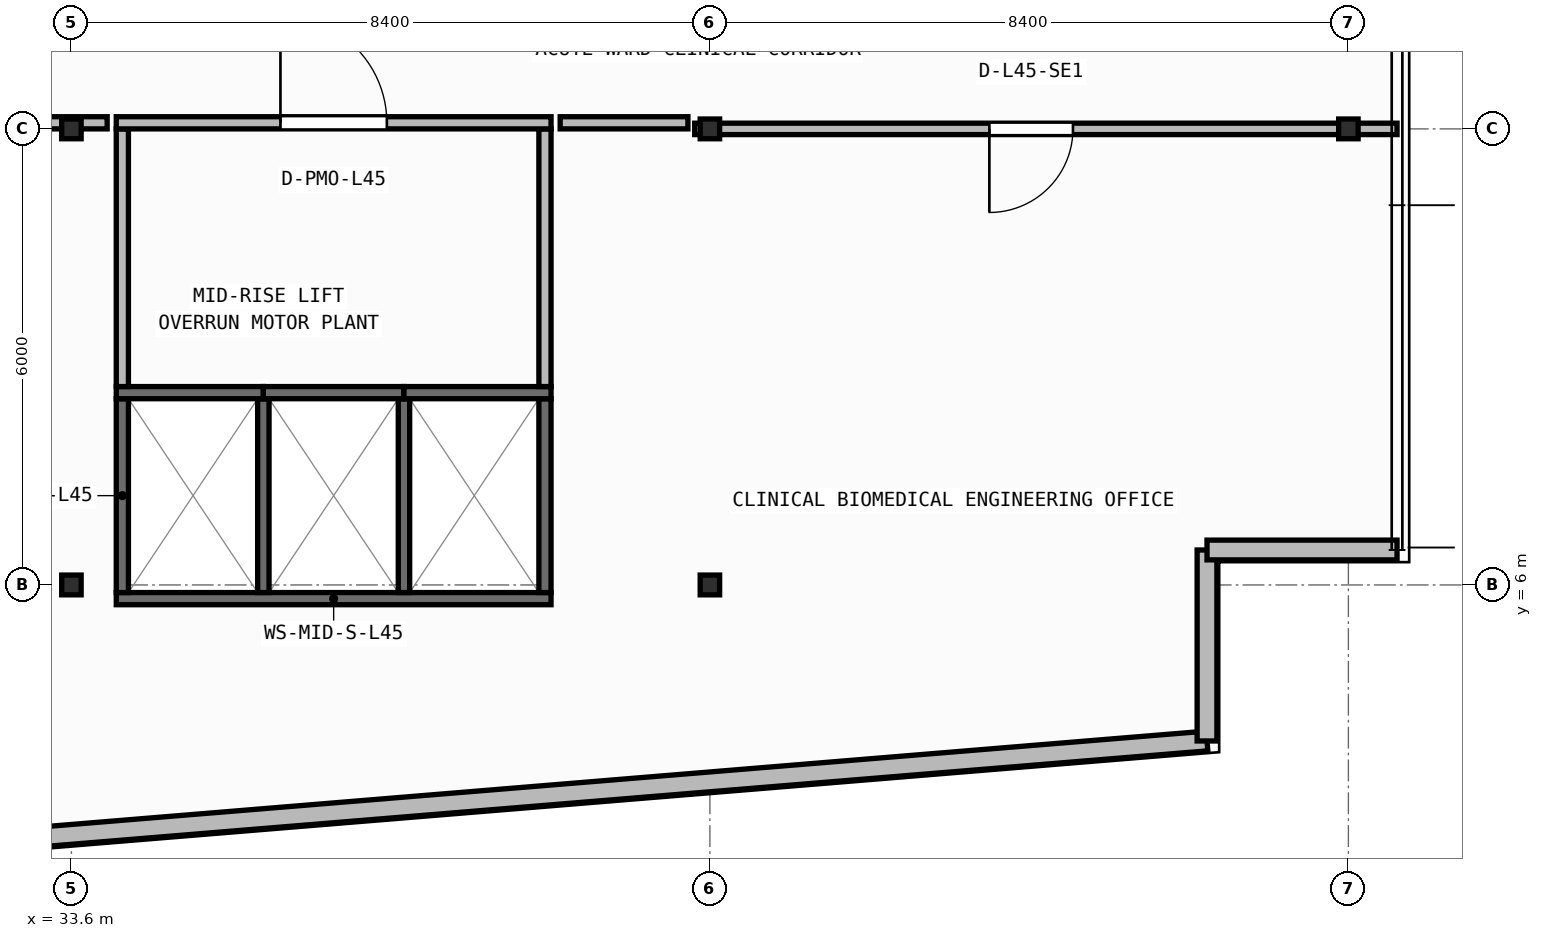
"""IFC4 building model, lengths in metres.
Left out: names, types, materials, properties, quantities, classifications, styles, units other than length and angle.
Written with IfcOpenShell. Run it as: python <this file> out.ifc"""

import sys

from ifc_helpers import new_model, si_unit, direction, frame, frame_2d, origin, origin_2d, place, context, subcontext, project, spatial, rectangle, i_section, extrude, element, fill, save


model = new_model("IFC4")
c1 = context("Model", 3, precision=1e-05, world=origin(), true_north=direction((0.0, 1.0)))
c2 = subcontext(c1, "Body", "Model", "MODEL_VIEW")
j1 = project(units=[si_unit("LENGTHUNIT", "METRE"), si_unit("PLANEANGLEUNIT", "RADIAN")], contexts=[c1])
p1 = place(None, origin())
s1 = spatial("IfcSite", under=j1, at=p1, CompositionType="ELEMENT")
p2 = place(p1, origin())
s2 = spatial("IfcBuilding", under=s1, at=p2, CompositionType="ELEMENT")
p3 = place(p2, frame((0.0, 0.0, 184.2)))
s3 = spatial("IfcBuildingStorey", under=s2, at=p3, CompositionType="ELEMENT", Elevation=184.2)
for number, where, z_axis, x_axis in (
    (1, (33.6, 6.0, 0.0), (0.0, 0.0, 1.0), (1.0, 0.0, 0.0)),
    (2, (42.0, 6.0, 0.0), (0.0, 0.0, 1.0), (1.0, 0.0, 0.0)),
    (3, (33.6, 12.0, 0.0), (0.0, 0.0, 1.0), (1.0, 0.0, 0.0)),
    (4, (42.0, 12.0, 0.0), (0.0, 0.0, 1.0), (1.0, 0.0, 0.0)),
    (5, (50.4, 12.0, 0.0), (0.0, 0.0, 1.0), (1.0, 0.0, 0.0)),
):
    element("IfcColumn", number, at=place(p3, frame(where, z_axis=z_axis, x_axis=x_axis)), inside=s3, PredefinedType="COLUMN", context=c2, shape_type="SweptSolid", body=[
        extrude(i_section(OverallWidth=0.256, OverallDepth=0.26, WebThickness=0.01, FlangeThickness=0.017, FilletRadius=0.013, at=origin_2d()), origin(), (0.0, 0.0, 1.0), 3.95),
    ])
p4 = place(p3, frame((2.66, 0.174, 0.0), z_axis=(0.0, 0.0, 1.0), x_axis=(0.996634028439, 0.081979347142, 0.0)))
e6 = element("IfcWall", 6, at=p4, inside=s3, PredefinedType="STANDARD", context=c2, shape_type="SweptSolid", body=[
    extrude(rectangle(XDim=46.035, YDim=0.26, at=frame_2d((23.018, 0.0))), origin(), (0.0, 0.0, 1.0), 3.71),
])
p5 = place(p4, frame((21.817, 0.0, 0.9)))
e7 = element("IfcOpeningElement", 7, at=p5, cuts=e6, PredefinedType="OPENING", context=c2, shape_type="SweptSolid", body=[
    extrude(rectangle(XDim=2.4, YDim=1.65, at=frame_2d((1.2, 0.825))), frame((0.0, 0.14, 0.0), z_axis=(0.0, -1.0, 0.0), x_axis=(1.0, 0.0, 0.0)), (0.0, 0.0, 1.0), 0.28),
])
p6 = place(p3, frame((48.54, 3.948, 0.0), z_axis=(0.0, 0.0, 1.0), x_axis=(0.0, 1.0, 0.0)))
e8 = element("IfcWall", 8, at=p6, inside=s3, PredefinedType="STANDARD", context=c2, shape_type="SweptSolid", body=[
    extrude(rectangle(XDim=2.512, YDim=0.26, at=frame_2d((1.256, 0.0))), origin(), (0.0, 0.0, 1.0), 3.71),
])
p7 = place(p3, frame((48.54, 6.46, 0.0), z_axis=(0.0, 0.0, 1.0), x_axis=(1.0, 0.0, 0.0)))
e9 = element("IfcWall", 9, at=p7, inside=s3, PredefinedType="STANDARD", context=c2, shape_type="SweptSolid", body=[
    extrude(rectangle(XDim=2.5, YDim=0.26, at=frame_2d((1.25, 0.0))), origin(), (0.0, 0.0, 1.0), 3.71),
])
p8 = place(p3, frame((34.19, 5.82, 0.0), z_axis=(0.0, 0.0, 1.0), x_axis=(1.0, 0.0, 0.0)))
e10 = element("IfcWall", 10, at=p8, inside=s3, PredefinedType="SHEAR", context=c2, shape_type="SweptSolid", body=[
    extrude(rectangle(XDim=5.72, YDim=0.16, at=frame_2d((2.86, 0.0))), origin(), (0.0, 0.0, 1.0), 3.71),
])
for number, where, z_axis, x_axis in (
    (11, (34.27, 5.9, 0.0), (0.0, 0.0, 1.0), (0.0, 1.0, 0.0)),
    (12, (39.83, 5.9, 0.0), (0.0, 0.0, 1.0), (0.0, 1.0, 0.0)),
):
    element("IfcWall", number, at=place(p3, frame(where, z_axis=z_axis, x_axis=x_axis)), inside=s3, PredefinedType="SHEAR", context=c2, shape_type="SweptSolid", body=[
        extrude(rectangle(XDim=2.55, YDim=0.16, at=frame_2d((1.275, 0.0))), origin(), (0.0, 0.0, 1.0), 3.71),
    ])
for number, where, z_axis, x_axis in (
    (13, (36.125, 5.9, 0.0), (0.0, 0.0, 1.0), (0.0, 1.0, 0.0)),
    (14, (37.975, 5.9, 0.0), (0.0, 0.0, 1.0), (0.0, 1.0, 0.0)),
):
    element("IfcWall", number, at=place(p3, frame(where, z_axis=z_axis, x_axis=x_axis)), inside=s3, PredefinedType="SHEAR", context=c2, shape_type="SweptSolid", body=[
        extrude(rectangle(XDim=2.55, YDim=0.15, at=frame_2d((1.275, 0.0))), origin(), (0.0, 0.0, 1.0), 3.71),
    ])
p9 = place(p3, frame((34.19, 8.53, 0.0), z_axis=(0.0, 0.0, 1.0), x_axis=(1.0, 0.0, 0.0)))
e15 = element("IfcWall", 15, at=p9, inside=s3, PredefinedType="SHEAR", context=c2, shape_type="SweptSolid", body=[
    extrude(rectangle(XDim=1.935, YDim=0.16, at=frame_2d((0.968, 0.0))), origin(), (0.0, 0.0, 1.0), 3.71),
])
p10 = place(p3, frame((36.125, 8.53, 0.0), z_axis=(0.0, 0.0, 1.0), x_axis=(1.0, 0.0, 0.0)))
e16 = element("IfcWall", 16, at=p10, inside=s3, PredefinedType="SHEAR", context=c2, shape_type="SweptSolid", body=[
    extrude(rectangle(XDim=1.85, YDim=0.16, at=frame_2d((0.925, 0.0))), origin(), (0.0, 0.0, 1.0), 3.71),
])
p11 = place(p3, frame((37.975, 8.53, 0.0), z_axis=(0.0, 0.0, 1.0), x_axis=(1.0, 0.0, 0.0)))
e17 = element("IfcWall", 17, at=p11, inside=s3, PredefinedType="SHEAR", context=c2, shape_type="SweptSolid", body=[
    extrude(rectangle(XDim=1.935, YDim=0.16, at=frame_2d((0.967, 0.0))), origin(), (0.0, 0.0, 1.0), 3.71),
])
for number, where, z_axis, x_axis in (
    (18, (34.27, 8.61, 0.0), (0.0, 0.0, 1.0), (0.0, 1.0, 0.0)),
    (19, (39.83, 8.61, 0.0), (0.0, 0.0, 1.0), (0.0, 1.0, 0.0)),
):
    element("IfcWall", number, at=place(p3, frame(where, z_axis=z_axis, x_axis=x_axis)), inside=s3, PredefinedType="PARTITIONING", context=c2, shape_type="SweptSolid", body=[
        extrude(rectangle(XDim=3.39, YDim=0.16, at=frame_2d((1.695, 0.0))), origin(), (0.0, 0.0, 1.0), 3.71),
    ])
p12 = place(p3, frame((34.19, 12.08, 0.0), z_axis=(0.0, 0.0, 1.0), x_axis=(1.0, 0.0, 0.0)))
e20 = element("IfcWall", 20, at=p12, inside=s3, PredefinedType="PARTITIONING", context=c2, shape_type="SweptSolid", body=[
    extrude(rectangle(XDim=5.72, YDim=0.16, at=frame_2d((2.86, 0.0))), origin(), (0.0, 0.0, 1.0), 3.152),
])
p13 = place(p12, frame((2.16, 0.0, 0.0)))
e21 = element("IfcOpeningElement", 21, at=p13, cuts=e20, PredefinedType="OPENING", context=c2, shape_type="SweptSolid", body=[
    extrude(rectangle(XDim=1.4, YDim=2.15, at=frame_2d((0.7, 1.075))), frame((0.0, 0.09, 0.0), z_axis=(0.0, -1.0, 0.0), x_axis=(1.0, 0.0, 0.0)), (0.0, 0.0, 1.0), 0.18),
])
p14 = place(p3, frame((51.04, 12.0, 0.0), z_axis=(0.0, 0.0, 1.0), x_axis=(-1.0, 0.0, 0.0)))
e22 = element("IfcWall", 22, at=p14, inside=s3, PredefinedType="PARTITIONING", context=c2, shape_type="SweptSolid", body=[
    extrude(rectangle(XDim=9.24, YDim=0.15, at=frame_2d((4.62, 0.0))), origin(), (0.0, 0.0, 1.0), 3.152),
])
p15 = place(p14, frame((4.263, 0.0, 0.0)))
e23 = element("IfcOpeningElement", 23, at=p15, cuts=e22, PredefinedType="OPENING", context=c2, shape_type="SweptSolid", body=[
    extrude(rectangle(XDim=1.1, YDim=2.1, at=frame_2d((0.55, 1.05))), frame((0.0, 0.085, 0.0), z_axis=(0.0, -1.0, 0.0), x_axis=(1.0, 0.0, 0.0)), (0.0, 0.0, 1.0), 0.17),
])
p16 = place(p3, frame((31.439, 12.08, 0.0), z_axis=(0.0, 0.0, 1.0), x_axis=(1.0, 0.0, 0.0)))
e24 = element("IfcWall", 24, at=p16, inside=s3, PredefinedType="PARTITIONING", context=c2, shape_type="SweptSolid", body=[
    extrude(rectangle(XDim=2.631, YDim=0.16, at=frame_2d((1.315, 0.0))), origin(), (0.0, 0.0, 1.0), 3.152),
])
p17 = place(p3, frame((40.03, 12.08, 0.0), z_axis=(0.0, 0.0, 1.0), x_axis=(1.0, 0.0, 0.0)))
e25 = element("IfcWall", 25, at=p17, inside=s3, PredefinedType="PARTITIONING", context=c2, shape_type="SweptSolid", body=[
    extrude(rectangle(XDim=1.681, YDim=0.16, at=frame_2d((0.84, 0.0))), origin(), (0.0, 0.0, 1.0), 3.152),
])
p18 = place(p13, origin())
e26 = element("IfcDoor", 26, at=p18, inside=s3, OperationType="SINGLE_SWING_LEFT", PredefinedType="DOOR", context=c2, shape_type="SweptSolid", body=[
    extrude(rectangle(XDim=1.4, YDim=2.15, at=frame_2d((0.7, 1.075))), frame((0.0, 0.025, 0.0), z_axis=(0.0, -1.0, 0.0), x_axis=(1.0, 0.0, 0.0)), (0.0, 0.0, 1.0), 0.05),
])
fill(e21, e26)
p19 = place(p15, origin())
e27 = element("IfcDoor", 27, at=p19, inside=s3, OperationType="SINGLE_SWING_RIGHT", PredefinedType="DOOR", context=c2, shape_type="SweptSolid", body=[
    extrude(rectangle(XDim=1.1, YDim=2.1, at=frame_2d((0.55, 1.05))), frame((0.0, 0.025, 0.0), z_axis=(0.0, -1.0, 0.0), x_axis=(1.0, 0.0, 0.0)), (0.0, 0.0, 1.0), 0.05),
])
fill(e23, e27)
save(model, sys.argv[1])
